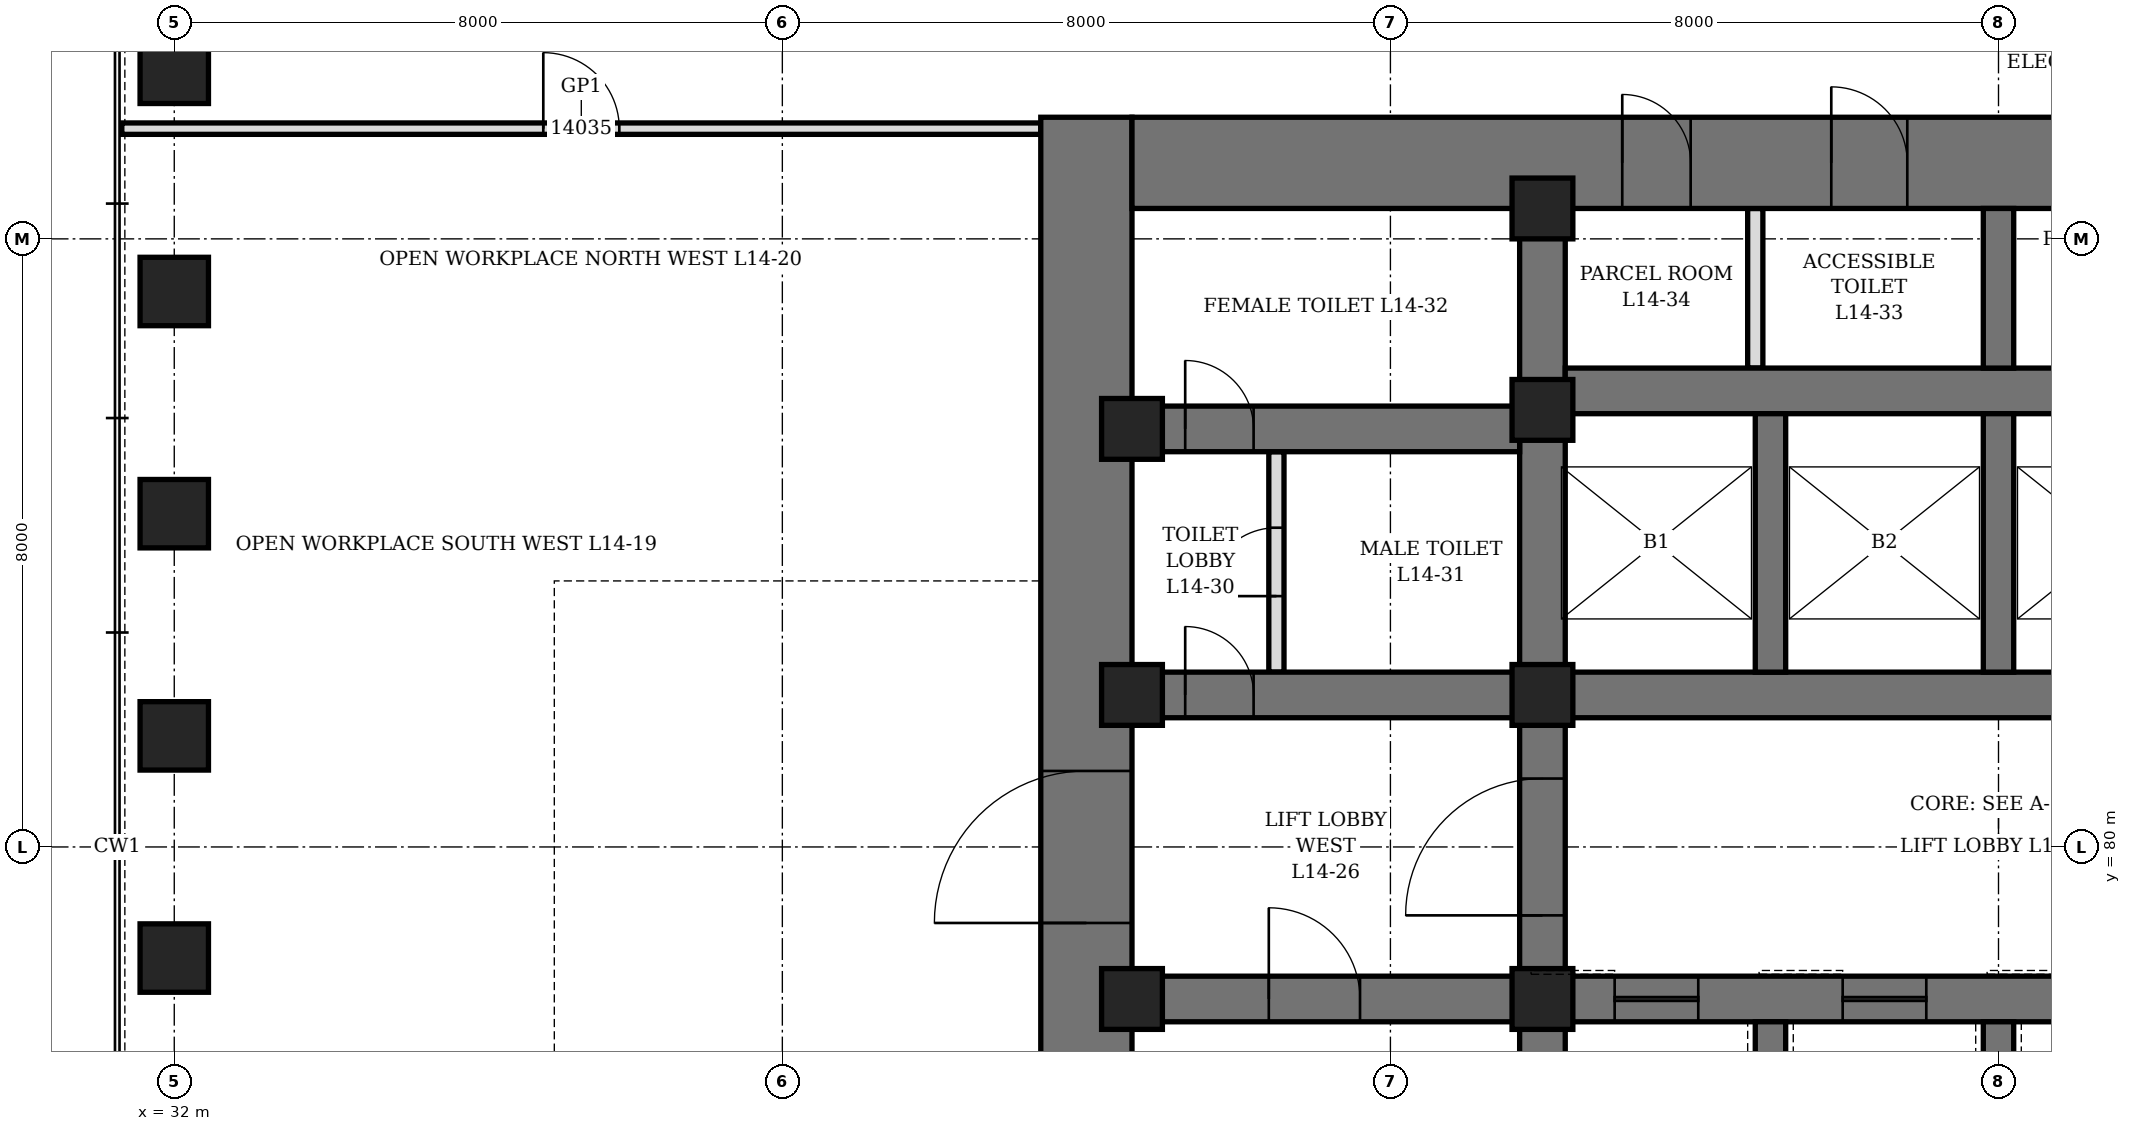
"""IFC4 building model, lengths in metres.
Left out: names, types, materials, properties, quantities, classifications, styles, units other than length and angle.
Written with IfcOpenShell. Run it as: python <this file> out.ifc"""

import sys

from ifc_helpers import new_model, si_unit, direction, frame, frame_2d, origin, origin_2d, place, context, subcontext, project, spatial, rectangle, hollow_rectangle, extrude, element, fill, save


model = new_model("IFC4")
c1 = context("Model", 3, precision=1e-05, world=origin(), true_north=direction((0.0, 1.0)))
c2 = subcontext(c1, "Body", "Model", "MODEL_VIEW")
j1 = project(units=[si_unit("LENGTHUNIT", "METRE"), si_unit("PLANEANGLEUNIT", "RADIAN")], contexts=[c1])
p1 = place(None, origin())
s1 = spatial("IfcSite", under=j1, at=p1, CompositionType="ELEMENT")
p2 = place(p1, origin())
s2 = spatial("IfcBuilding", under=s1, at=p2, CompositionType="ELEMENT")
p3 = place(p2, frame((0.0, 0.0, 68.5)))
s3 = spatial("IfcBuildingStorey", under=s2, at=p3, CompositionType="ELEMENT", Elevation=68.5)
for number, where, z_axis, x_axis in (
    (1, (32.0, 90.231, 0.0), (0.0, 0.0, 1.0), (0.0, 1.0, 0.0)),
    (2, (32.0, 87.308, 0.0), (0.0, 0.0, 1.0), (0.0, 1.0, 0.0)),
    (3, (32.0, 84.385, 0.0), (0.0, 0.0, 1.0), (0.0, 1.0, 0.0)),
    (4, (32.0, 81.461, 0.0), (0.0, 0.0, 1.0), (0.0, 1.0, 0.0)),
    (5, (32.0, 78.539, 0.0), (0.0, 0.0, 1.0), (0.0, 1.0, 0.0)),
):
    element("IfcColumn", number, at=place(p3, frame(where, z_axis=z_axis, x_axis=x_axis)), inside=s3, PredefinedType="COLUMN", context=c2, shape_type="SweptSolid", body=[
        extrude(hollow_rectangle(XDim=0.9, YDim=0.9, WallThickness=0.12, at=origin_2d()), origin(), (0.0, 0.0, 1.0), 4.2),
    ])
p4 = place(p3, frame((44.0, 70.4, 0.0), z_axis=(0.0, 0.0, 1.0), x_axis=(0.0, 1.0, 0.0)))
e6 = element("IfcWall", 6, at=p4, inside=s3, PredefinedType="SHEAR", context=c2, shape_type="SweptSolid", body=[
    extrude(rectangle(XDim=19.2, YDim=1.2, at=frame_2d((9.6, 0.0))), origin(), (0.0, 0.0, 1.0), 4.2),
])
p5 = place(p4, frame((8.6, 0.0, 0.0)))
e7 = element("IfcOpeningElement", 7, at=p5, cuts=e6, PredefinedType="OPENING", context=c2, shape_type="SweptSolid", body=[
    extrude(rectangle(XDim=2.0, YDim=2.4, at=frame_2d((1.0, 1.2))), frame((0.0, 0.61, 0.0), z_axis=(0.0, -1.0, 0.0), x_axis=(1.0, 0.0, 0.0)), (0.0, 0.0, 1.0), 1.22),
])
p6 = place(p3, frame((44.6, 89.0, 0.0), z_axis=(0.0, 0.0, 1.0), x_axis=(1.0, 0.0, 0.0)))
e8 = element("IfcWall", 8, at=p6, inside=s3, PredefinedType="SHEAR", context=c2, shape_type="SweptSolid", body=[
    extrude(rectangle(XDim=22.8, YDim=1.2, at=frame_2d((11.4, 0.0))), origin(), (0.0, 0.0, 1.0), 4.2),
])
p7 = place(p6, frame((9.2, 0.0, 0.0)))
e9 = element("IfcOpeningElement", 9, at=p7, cuts=e8, PredefinedType="OPENING", context=c2, shape_type="SweptSolid", body=[
    extrude(rectangle(XDim=1.0, YDim=2.1, at=frame_2d((0.5, 1.05))), frame((0.0, 0.61, 0.0), z_axis=(0.0, -1.0, 0.0), x_axis=(1.0, 0.0, 0.0)), (0.0, 0.0, 1.0), 1.22),
])
p8 = place(p6, frame((6.45, 0.0, 0.0)))
e10 = element("IfcOpeningElement", 10, at=p8, cuts=e8, PredefinedType="OPENING", context=c2, shape_type="SweptSolid", body=[
    extrude(rectangle(XDim=0.9, YDim=2.1, at=frame_2d((0.45, 1.05))), frame((0.0, 0.61, 0.0), z_axis=(0.0, -1.0, 0.0), x_axis=(1.0, 0.0, 0.0)), (0.0, 0.0, 1.0), 1.22),
])
p9 = place(p6, frame((13.05, 0.0, 0.0)))
e11 = element("IfcOpeningElement", 11, at=p9, cuts=e8, PredefinedType="OPENING", context=c2, shape_type="SweptSolid", body=[
    extrude(rectangle(XDim=0.9, YDim=2.1, at=frame_2d((0.45, 1.05))), frame((0.0, 0.61, 0.0), z_axis=(0.0, -1.0, 0.0), x_axis=(1.0, 0.0, 0.0)), (0.0, 0.0, 1.0), 1.22),
])
p10 = place(p3, frame((50.0, 71.6, 0.0), z_axis=(0.0, 0.0, 1.0), x_axis=(0.0, 1.0, 0.0)))
e12 = element("IfcWall", 12, at=p10, inside=s3, PredefinedType="SHEAR", context=c2, shape_type="SweptSolid", body=[
    extrude(rectangle(XDim=16.8, YDim=0.6, at=frame_2d((8.4, 0.0))), origin(), (0.0, 0.0, 1.0), 4.2),
])
p11 = place(p10, frame((7.5, 0.0, 0.0)))
e13 = element("IfcOpeningElement", 13, at=p11, cuts=e12, PredefinedType="OPENING", context=c2, shape_type="SweptSolid", body=[
    extrude(rectangle(XDim=1.8, YDim=2.4, at=frame_2d((0.9, 1.2))), frame((0.0, 0.31, 0.0), z_axis=(0.0, -1.0, 0.0), x_axis=(1.0, 0.0, 0.0)), (0.0, 0.0, 1.0), 0.62),
])
p12 = place(p3, frame((44.6, 78.0, 0.0), z_axis=(0.0, 0.0, 1.0), x_axis=(1.0, 0.0, 0.0)))
e14 = element("IfcWall", 14, at=p12, inside=s3, PredefinedType="SHEAR", context=c2, shape_type="SweptSolid", body=[
    extrude(rectangle(XDim=5.1, YDim=0.6, at=frame_2d((2.55, 0.0))), origin(), (0.0, 0.0, 1.0), 4.2),
])
p13 = place(p12, frame((1.8, 0.0, 0.0)))
e15 = element("IfcOpeningElement", 15, at=p13, cuts=e14, PredefinedType="OPENING", context=c2, shape_type="SweptSolid", body=[
    extrude(rectangle(XDim=1.2, YDim=2.1, at=frame_2d((0.6, 1.05))), frame((0.0, 0.31, 0.0), z_axis=(0.0, -1.0, 0.0), x_axis=(1.0, 0.0, 0.0)), (0.0, 0.0, 1.0), 0.62),
])
p14 = place(p3, frame((44.6, 82.0, 0.0), z_axis=(0.0, 0.0, 1.0), x_axis=(1.0, 0.0, 0.0)))
e16 = element("IfcWall", 16, at=p14, inside=s3, PredefinedType="SHEAR", context=c2, shape_type="SweptSolid", body=[
    extrude(rectangle(XDim=5.1, YDim=0.6, at=frame_2d((2.55, 0.0))), origin(), (0.0, 0.0, 1.0), 4.2),
])
p15 = place(p14, frame((0.7, 0.0, 0.0)))
e17 = element("IfcOpeningElement", 17, at=p15, cuts=e16, PredefinedType="OPENING", context=c2, shape_type="SweptSolid", body=[
    extrude(rectangle(XDim=0.9, YDim=2.1, at=frame_2d((0.45, 1.05))), frame((0.0, 0.31, 0.0), z_axis=(0.0, -1.0, 0.0), x_axis=(1.0, 0.0, 0.0)), (0.0, 0.0, 1.0), 0.62),
])
p16 = place(p3, frame((44.6, 85.5, 0.0), z_axis=(0.0, 0.0, 1.0), x_axis=(1.0, 0.0, 0.0)))
e18 = element("IfcWall", 18, at=p16, inside=s3, PredefinedType="SHEAR", context=c2, shape_type="SweptSolid", body=[
    extrude(rectangle(XDim=5.1, YDim=0.6, at=frame_2d((2.55, 0.0))), origin(), (0.0, 0.0, 1.0), 4.2),
])
p17 = place(p16, frame((0.7, 0.0, 0.0)))
e19 = element("IfcOpeningElement", 19, at=p17, cuts=e18, PredefinedType="OPENING", context=c2, shape_type="SweptSolid", body=[
    extrude(rectangle(XDim=0.9, YDim=2.1, at=frame_2d((0.45, 1.05))), frame((0.0, 0.31, 0.0), z_axis=(0.0, -1.0, 0.0), x_axis=(1.0, 0.0, 0.0)), (0.0, 0.0, 1.0), 0.62),
])
p18 = place(p3, frame((50.3, 78.0, 0.0), z_axis=(0.0, 0.0, 1.0), x_axis=(1.0, 0.0, 0.0)))
e20 = element("IfcWall", 20, at=p18, inside=s3, PredefinedType="SHEAR", context=c2, shape_type="SweptSolid", body=[
    extrude(rectangle(XDim=11.4, YDim=0.6, at=frame_2d((5.7, 0.0))), origin(), (0.0, 0.0, 1.0), 4.2),
])
p19 = place(p18, frame((0.65, 0.0, 0.0)))
e21 = element("IfcOpeningElement", 21, at=p19, cuts=e20, PredefinedType="OPENING", context=c2, shape_type="SweptSolid", body=[
    extrude(rectangle(XDim=1.1, YDim=2.2, at=frame_2d((0.55, 1.1))), frame((0.0, 0.31, 0.0), z_axis=(0.0, -1.0, 0.0), x_axis=(1.0, 0.0, 0.0)), (0.0, 0.0, 1.0), 0.62),
])
p20 = place(p18, frame((3.65, 0.0, 0.0)))
e22 = element("IfcOpeningElement", 22, at=p20, cuts=e20, PredefinedType="OPENING", context=c2, shape_type="SweptSolid", body=[
    extrude(rectangle(XDim=1.1, YDim=2.2, at=frame_2d((0.55, 1.1))), frame((0.0, 0.31, 0.0), z_axis=(0.0, -1.0, 0.0), x_axis=(1.0, 0.0, 0.0)), (0.0, 0.0, 1.0), 0.62),
])
p21 = place(p18, frame((6.65, 0.0, 0.0)))
e23 = element("IfcOpeningElement", 23, at=p21, cuts=e20, PredefinedType="OPENING", context=c2, shape_type="SweptSolid", body=[
    extrude(rectangle(XDim=1.1, YDim=2.2, at=frame_2d((0.55, 1.1))), frame((0.0, 0.31, 0.0), z_axis=(0.0, -1.0, 0.0), x_axis=(1.0, 0.0, 0.0)), (0.0, 0.0, 1.0), 0.62),
])
p22 = place(p18, frame((9.65, 0.0, 0.0)))
e24 = element("IfcOpeningElement", 24, at=p22, cuts=e20, PredefinedType="OPENING", context=c2, shape_type="SweptSolid", body=[
    extrude(rectangle(XDim=1.1, YDim=2.2, at=frame_2d((0.55, 1.1))), frame((0.0, 0.31, 0.0), z_axis=(0.0, -1.0, 0.0), x_axis=(1.0, 0.0, 0.0)), (0.0, 0.0, 1.0), 0.62),
])
for number, where, z_axis, x_axis in (
    (25, (50.3, 82.0, 0.0), (0.0, 0.0, 1.0), (1.0, 0.0, 0.0)),
    (26, (50.3, 86.0, 0.0), (0.0, 0.0, 1.0), (1.0, 0.0, 0.0)),
):
    element("IfcWall", number, at=place(p3, frame(where, z_axis=z_axis, x_axis=x_axis)), inside=s3, PredefinedType="SHEAR", context=c2, shape_type="SweptSolid", body=[
        extrude(rectangle(XDim=11.4, YDim=0.6, at=frame_2d((5.7, 0.0))), origin(), (0.0, 0.0, 1.0), 4.2),
    ])
p23 = place(p3, frame((53.0, 74.2, 0.0), z_axis=(0.0, 0.0, 1.0), x_axis=(0.0, 1.0, 0.0)))
e27 = element("IfcWall", 27, at=p23, inside=s3, PredefinedType="SHEAR", context=c2, shape_type="SweptSolid", body=[
    extrude(rectangle(XDim=3.5, YDim=0.4, at=frame_2d((1.75, 0.0))), origin(), (0.0, 0.0, 1.0), 4.2),
])
p24 = place(p3, frame((53.0, 82.3, 0.0), z_axis=(0.0, 0.0, 1.0), x_axis=(0.0, 1.0, 0.0)))
e28 = element("IfcWall", 28, at=p24, inside=s3, PredefinedType="SHEAR", context=c2, shape_type="SweptSolid", body=[
    extrude(rectangle(XDim=3.4, YDim=0.4, at=frame_2d((1.7, 0.0))), origin(), (0.0, 0.0, 1.0), 4.2),
])
p25 = place(p3, frame((56.0, 74.2, 0.0), z_axis=(0.0, 0.0, 1.0), x_axis=(0.0, 1.0, 0.0)))
e29 = element("IfcWall", 29, at=p25, inside=s3, PredefinedType="SHEAR", context=c2, shape_type="SweptSolid", body=[
    extrude(rectangle(XDim=3.5, YDim=0.4, at=frame_2d((1.75, 0.0))), origin(), (0.0, 0.0, 1.0), 4.2),
])
p26 = place(p3, frame((56.0, 82.3, 0.0), z_axis=(0.0, 0.0, 1.0), x_axis=(0.0, 1.0, 0.0)))
e30 = element("IfcWall", 30, at=p26, inside=s3, PredefinedType="SHEAR", context=c2, shape_type="SweptSolid", body=[
    extrude(rectangle(XDim=3.4, YDim=0.4, at=frame_2d((1.7, 0.0))), origin(), (0.0, 0.0, 1.0), 4.2),
])
p27 = place(p3, frame((56.0, 86.3, 0.0), z_axis=(0.0, 0.0, 1.0), x_axis=(0.0, 1.0, 0.0)))
e31 = element("IfcWall", 31, at=p27, inside=s3, PredefinedType="SHEAR", context=c2, shape_type="SweptSolid", body=[
    extrude(rectangle(XDim=2.1, YDim=0.4, at=frame_2d((1.05, 0.0))), origin(), (0.0, 0.0, 1.0), 4.2),
])
for number, where, z_axis, x_axis in (
    (32, (44.6, 78.0, 0.0), (0.0, 0.0, 1.0), (1.0, 0.0, 0.0)),
    (33, (44.6, 82.0, 0.0), (0.0, 0.0, 1.0), (1.0, 0.0, 0.0)),
    (34, (44.6, 85.5, 0.0), (0.0, 0.0, 1.0), (1.0, 0.0, 0.0)),
    (35, (50.0, 78.0, 0.0), (0.0, 0.0, 1.0), (1.0, 0.0, 0.0)),
    (36, (50.0, 82.0, 0.0), (0.0, 0.0, 1.0), (1.0, 0.0, 0.0)),
    (37, (50.0, 85.75, 0.0), (0.0, 0.0, 1.0), (1.0, 0.0, 0.0)),
    (38, (50.0, 88.4, 0.0), (0.0, 0.0, 1.0), (1.0, 0.0, 0.0)),
):
    element("IfcColumn", number, at=place(p3, frame(where, z_axis=z_axis, x_axis=x_axis)), inside=s3, PredefinedType="COLUMN", context=c2, shape_type="SweptSolid", body=[
        extrude(hollow_rectangle(XDim=0.8, YDim=0.8, WallThickness=0.1, at=origin_2d()), origin(), (0.0, 0.0, 1.0), 4.2),
    ])
p28 = place(p3, frame((46.5, 82.3, 0.0), z_axis=(0.0, 0.0, 1.0), x_axis=(0.0, 1.0, 0.0)))
e39 = element("IfcWall", 39, at=p28, inside=s3, PredefinedType="PARTITIONING", context=c2, shape_type="SweptSolid", body=[
    extrude(rectangle(XDim=2.9, YDim=0.2, at=frame_2d((1.45, 0.0))), origin(), (0.0, 0.0, 1.0), 4.04),
])
p29 = place(p28, frame((1.0, 0.0, 0.0)))
e40 = element("IfcOpeningElement", 40, at=p29, cuts=e39, PredefinedType="OPENING", context=c2, shape_type="SweptSolid", body=[
    extrude(rectangle(XDim=0.9, YDim=2.1, at=frame_2d((0.45, 1.05))), frame((0.0, 0.11, 0.0), z_axis=(0.0, -1.0, 0.0), x_axis=(1.0, 0.0, 0.0)), (0.0, 0.0, 1.0), 0.22),
])
p30 = place(p3, frame((52.8, 86.3, 0.0), z_axis=(0.0, 0.0, 1.0), x_axis=(0.0, 1.0, 0.0)))
e41 = element("IfcWall", 41, at=p30, inside=s3, PredefinedType="PARTITIONING", context=c2, shape_type="SweptSolid", body=[
    extrude(rectangle(XDim=2.1, YDim=0.2, at=frame_2d((1.05, 0.0))), origin(), (0.0, 0.0, 1.0), 4.04),
])
p31 = place(p3, frame((31.31, 89.45, 0.0), z_axis=(0.0, 0.0, 1.0), x_axis=(1.0, 0.0, 0.0)))
e42 = element("IfcWall", 42, at=p31, inside=s3, PredefinedType="PARTITIONING", context=c2, shape_type="SweptSolid", body=[
    extrude(rectangle(XDim=12.09, YDim=0.15, at=frame_2d((6.045, 0.0))), origin(), (0.0, 0.0, 1.0), 4.04),
])
p32 = place(p31, frame((5.545, 0.0, 0.0)))
e43 = element("IfcOpeningElement", 43, at=p32, cuts=e42, PredefinedType="OPENING", context=c2, shape_type="SweptSolid", body=[
    extrude(rectangle(XDim=1.0, YDim=2.4, at=frame_2d((0.5, 1.2))), frame((0.0, 0.085, 0.0), z_axis=(0.0, -1.0, 0.0), x_axis=(1.0, 0.0, 0.0)), (0.0, 0.0, 1.0), 0.17),
])
p33 = place(p15, origin())
e44 = element("IfcDoor", 44, at=p33, inside=s3, OperationType="SINGLE_SWING_LEFT", PredefinedType="DOOR", context=c2, shape_type="SweptSolid", body=[
    extrude(rectangle(XDim=0.9, YDim=2.1, at=frame_2d((0.45, 1.05))), frame((0.0, 0.3, 0.0), z_axis=(0.0, -1.0, 0.0), x_axis=(1.0, 0.0, 0.0)), (0.0, 0.0, 1.0), 0.6),
])
fill(e17, e44)
p34 = place(p29, origin())
e45 = element("IfcDoor", 45, at=p34, inside=s3, OperationType="SINGLE_SWING_RIGHT", PredefinedType="DOOR", context=c2, shape_type="SweptSolid", body=[
    extrude(rectangle(XDim=0.9, YDim=2.1, at=frame_2d((0.45, 1.05))), frame((0.0, 0.1, 0.0), z_axis=(0.0, -1.0, 0.0), x_axis=(1.0, 0.0, 0.0)), (0.0, 0.0, 1.0), 0.199),
])
fill(e40, e45)
p35 = place(p17, origin())
e46 = element("IfcDoor", 46, at=p35, inside=s3, OperationType="SINGLE_SWING_RIGHT", PredefinedType="DOOR", context=c2, shape_type="SweptSolid", body=[
    extrude(rectangle(XDim=0.9, YDim=2.1, at=frame_2d((0.45, 1.05))), frame((0.0, 0.3, 0.0), z_axis=(0.0, -1.0, 0.0), x_axis=(1.0, 0.0, 0.0)), (0.0, 0.0, 1.0), 0.6),
])
fill(e19, e46)
p36 = place(p7, origin())
e47 = element("IfcDoor", 47, at=p36, inside=s3, OperationType="SINGLE_SWING_LEFT", PredefinedType="DOOR", context=c2, shape_type="SweptSolid", body=[
    extrude(rectangle(XDim=1.0, YDim=2.1, at=frame_2d((0.5, 1.05))), frame((0.0, 0.35, 0.0), z_axis=(0.0, -1.0, 0.0), x_axis=(1.0, 0.0, 0.0)), (0.0, 0.0, 1.0), 0.7),
])
fill(e9, e47)
p37 = place(p8, origin())
e48 = element("IfcDoor", 48, at=p37, inside=s3, OperationType="SINGLE_SWING_LEFT", PredefinedType="DOOR", context=c2, shape_type="SweptSolid", body=[
    extrude(rectangle(XDim=0.9, YDim=2.1, at=frame_2d((0.45, 1.05))), frame((0.0, 0.35, 0.0), z_axis=(0.0, -1.0, 0.0), x_axis=(1.0, 0.0, 0.0)), (0.0, 0.0, 1.0), 0.7),
])
fill(e10, e48)
p38 = place(p13, origin())
e49 = element("IfcDoor", 49, at=p38, inside=s3, OperationType="SINGLE_SWING_LEFT", PredefinedType="DOOR", context=c2, shape_type="SweptSolid", body=[
    extrude(rectangle(XDim=1.2, YDim=2.1, at=frame_2d((0.6, 1.05))), frame((0.0, 0.3, 0.0), z_axis=(0.0, -1.0, 0.0), x_axis=(1.0, 0.0, 0.0)), (0.0, 0.0, 1.0), 0.6),
])
fill(e15, e49)
p39 = place(p5, origin())
e50 = element("IfcDoor", 50, at=p39, inside=s3, OperationType="DOUBLE_DOOR_SINGLE_SWING", PredefinedType="DOOR", context=c2, shape_type="SweptSolid", body=[
    extrude(rectangle(XDim=2.0, YDim=2.4, at=frame_2d((1.0, 1.2))), frame((0.0, 0.35, 0.0), z_axis=(0.0, -1.0, 0.0), x_axis=(1.0, 0.0, 0.0)), (0.0, 0.0, 1.0), 0.7),
])
fill(e7, e50)
p40 = place(p11, origin())
e51 = element("IfcDoor", 51, at=p40, inside=s3, OperationType="DOUBLE_DOOR_SINGLE_SWING", PredefinedType="DOOR", context=c2, shape_type="SweptSolid", body=[
    extrude(rectangle(XDim=1.8, YDim=2.4, at=frame_2d((0.9, 1.2))), frame((0.0, 0.3, 0.0), z_axis=(0.0, -1.0, 0.0), x_axis=(1.0, 0.0, 0.0)), (0.0, 0.0, 1.0), 0.6),
])
fill(e13, e51)
p41 = place(p19, origin())
e52 = element("IfcDoor", 52, at=p41, inside=s3, OperationType="SLIDING_TO_LEFT", PredefinedType="DOOR", context=c2, shape_type="SweptSolid", body=[
    extrude(rectangle(XDim=1.1, YDim=2.2, at=frame_2d((0.55, 1.1))), frame((0.0, 0.3, 0.0), z_axis=(0.0, -1.0, 0.0), x_axis=(1.0, 0.0, 0.0)), (0.0, 0.0, 1.0), 0.6),
])
fill(e21, e52)
p42 = place(p20, origin())
e53 = element("IfcDoor", 53, at=p42, inside=s3, OperationType="SLIDING_TO_LEFT", PredefinedType="DOOR", context=c2, shape_type="SweptSolid", body=[
    extrude(rectangle(XDim=1.1, YDim=2.2, at=frame_2d((0.55, 1.1))), frame((0.0, 0.3, 0.0), z_axis=(0.0, -1.0, 0.0), x_axis=(1.0, 0.0, 0.0)), (0.0, 0.0, 1.0), 0.6),
])
fill(e22, e53)
p43 = place(p32, origin())
e54 = element("IfcDoor", 54, at=p43, inside=s3, OperationType="SINGLE_SWING_RIGHT", PredefinedType="DOOR", context=c2, shape_type="SweptSolid", body=[
    extrude(rectangle(XDim=1.0, YDim=2.4, at=frame_2d((0.5, 1.2))), frame((0.0, 0.075, 0.0), z_axis=(0.0, -1.0, 0.0), x_axis=(1.0, 0.0, 0.0)), (0.0, 0.0, 1.0), 0.149),
])
fill(e43, e54)
save(model, sys.argv[1])
